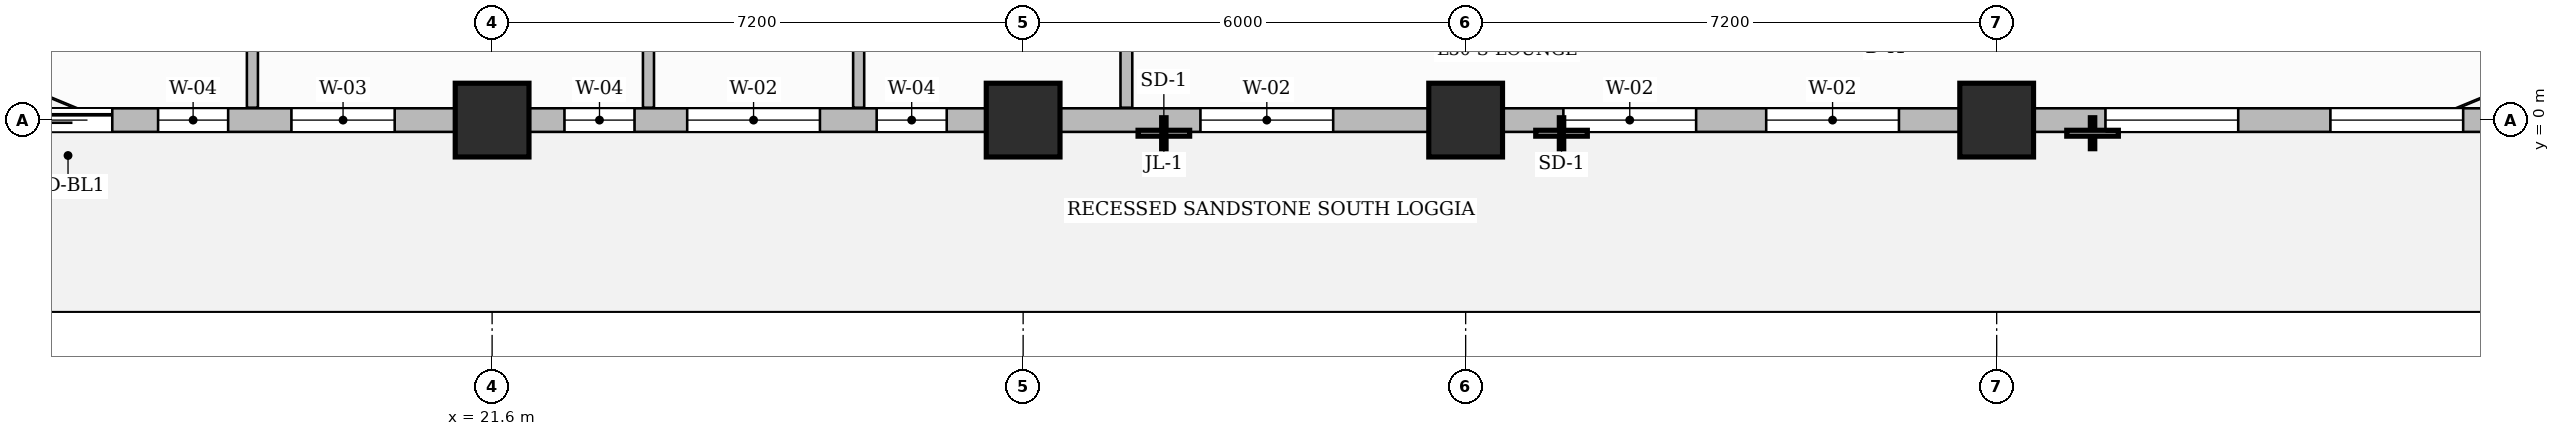
"""IFC4 building model, lengths in metres.
Left out: names, types, materials, properties, quantities, classifications, styles, units other than length and angle.
Written with IfcOpenShell. Run it as: python <this file> out.ifc"""

import sys

from ifc_helpers import new_model, si_unit, direction, frame, frame_2d, origin, origin_2d, place, context, subcontext, project, spatial, rectangle, extrude, source, transform, mapped, element, fill, save


model = new_model("IFC4")
c1 = context("Model", 3, precision=1e-05, world=origin(), true_north=direction((0.0, 1.0)))
c2 = subcontext(c1, "Body", "Model", "MODEL_VIEW")
j1 = project(units=[si_unit("LENGTHUNIT", "METRE"), si_unit("PLANEANGLEUNIT", "RADIAN")], contexts=[c1])
p1 = place(None, origin())
s1 = spatial("IfcSite", under=j1, at=p1, CompositionType="ELEMENT")
p2 = place(p1, origin())
s2 = spatial("IfcBuilding", under=s1, at=p2, CompositionType="ELEMENT")
p3 = place(p2, frame((0.0, 0.0, 122.9)))
s3 = spatial("IfcBuildingStorey", under=s2, at=p3, CompositionType="ELEMENT", Elevation=122.9)
m1 = source(origin(), c2, "Body", "SweptSolid", [
    extrude(rectangle(XDim=1.0, YDim=1.0, at=origin_2d()), origin(), (0.0, 0.0, 1.0), 3.7),
])
for number, where, z_axis, x_axis in (
    (1, (21.6, 0.0, 0.0), (0.0, 0.0, 1.0), (1.0, 0.0, 0.0)),
    (2, (28.8, 0.0, 0.0), (0.0, 0.0, 1.0), (1.0, 0.0, 0.0)),
    (3, (34.8, 0.0, 0.0), (0.0, 0.0, 1.0), (1.0, 0.0, 0.0)),
    (4, (42.0, 0.0, 0.0), (0.0, 0.0, 1.0), (1.0, 0.0, 0.0)),
):
    element("IfcColumn", number, at=place(p3, frame(where, z_axis=z_axis, x_axis=x_axis)), inside=s3, PredefinedType="COLUMN", context=c2, shape_type="MappedRepresentation", body=[
        mapped(m1, transform((0.0, 0.0, 0.0), scale=1.0)),
    ])
p4 = place(p3, frame((30.2, 0.168, 0.0), z_axis=(0.0, 0.0, 1.0), x_axis=(0.0, 1.0, 0.0)))
e5 = element("IfcWall", 5, at=p4, inside=s3, PredefinedType="PARTITIONING", context=c2, shape_type="SweptSolid", body=[
    extrude(rectangle(XDim=10.092, YDim=0.16, at=frame_2d((5.046, 0.0))), origin(), (0.0, 0.0, 1.0), 3.45),
])
p5 = place(p4, frame((1.957, 0.0, 0.0)))
e6 = element("IfcOpeningElement", 6, at=p5, cuts=e5, PredefinedType="OPENING", context=c2, shape_type="SweptSolid", body=[
    extrude(rectangle(XDim=1.05, YDim=2.15, at=frame_2d((0.525, 1.075))), frame((0.0, 0.09, 0.0), z_axis=(0.0, -1.0, 0.0), x_axis=(1.0, 0.0, 0.0)), (0.0, 0.0, 1.0), 0.18),
])
for number, where, z_axis, x_axis in (
    (7, (18.35, 0.168, 0.0), (0.0, 0.0, 1.0), (0.0, 1.0, 0.0)),
    (8, (23.72, 0.168, 0.0), (0.0, 0.0, 1.0), (0.0, 1.0, 0.0)),
    (9, (26.57, 0.168, 0.0), (0.0, 0.0, 1.0), (0.0, 1.0, 0.0)),
):
    element("IfcWall", number, at=place(p3, frame(where, z_axis=z_axis, x_axis=x_axis)), inside=s3, PredefinedType="PARTITIONING", context=c2, shape_type="SweptSolid", body=[
        extrude(rectangle(XDim=10.092, YDim=0.15, at=frame_2d((5.046, 0.0))), origin(), (0.0, 0.0, 1.0), 3.45),
    ])
p6 = place(p3, frame((14.4, 0.0, 0.0), z_axis=(0.0, 0.0, 1.0), x_axis=(1.0, 0.0, 0.0)))
e10 = element("IfcWall", 10, at=p6, inside=s3, PredefinedType="SOLIDWALL", context=c2, shape_type="SweptSolid", body=[
    extrude(rectangle(XDim=35.4, YDim=0.32, at=frame_2d((17.7, 0.0))), origin(), (0.0, 0.0, 1.0), 2.935),
])
p7 = place(p6, frame((0.85, 0.0, 0.0)))
e11 = element("IfcOpeningElement", 11, at=p7, cuts=e10, PredefinedType="OPENING", context=c2, shape_type="SweptSolid", body=[
    extrude(rectangle(XDim=1.2, YDim=2.2, at=frame_2d((0.6, 1.1))), frame((0.0, 0.17, 0.0), z_axis=(0.0, -1.0, 0.0), x_axis=(1.0, 0.0, 0.0)), (0.0, 0.0, 1.0), 0.34),
])
p8 = place(p6, frame((2.671, 0.0, 0.8)))
e12 = element("IfcOpeningElement", 12, at=p8, cuts=e10, PredefinedType="OPENING", context=c2, shape_type="SweptSolid", body=[
    extrude(rectangle(XDim=0.95, YDim=1.75, at=frame_2d((0.475, 0.875))), frame((0.0, 0.17, 0.0), z_axis=(0.0, -1.0, 0.0), x_axis=(1.0, 0.0, 0.0)), (0.0, 0.0, 1.0), 0.34),
])
p9 = place(p6, frame((4.479, 0.0, 0.8)))
e13 = element("IfcOpeningElement", 13, at=p9, cuts=e10, PredefinedType="OPENING", context=c2, shape_type="SweptSolid", body=[
    extrude(rectangle(XDim=1.4, YDim=1.85, at=frame_2d((0.7, 0.925))), frame((0.0, 0.17, 0.0), z_axis=(0.0, -1.0, 0.0), x_axis=(1.0, 0.0, 0.0)), (0.0, 0.0, 1.0), 0.34),
])
p10 = place(p6, frame((8.181, 0.0, 0.8)))
e14 = element("IfcOpeningElement", 14, at=p10, cuts=e10, PredefinedType="OPENING", context=c2, shape_type="SweptSolid", body=[
    extrude(rectangle(XDim=0.95, YDim=1.75, at=frame_2d((0.475, 0.875))), frame((0.0, 0.17, 0.0), z_axis=(0.0, -1.0, 0.0), x_axis=(1.0, 0.0, 0.0)), (0.0, 0.0, 1.0), 0.34),
])
p11 = place(p6, frame((9.845, 0.0, 0.8)))
e15 = element("IfcOpeningElement", 15, at=p11, cuts=e10, PredefinedType="OPENING", context=c2, shape_type="SweptSolid", body=[
    extrude(rectangle(XDim=1.8, YDim=1.85, at=frame_2d((0.9, 0.925))), frame((0.0, 0.17, 0.0), z_axis=(0.0, -1.0, 0.0), x_axis=(1.0, 0.0, 0.0)), (0.0, 0.0, 1.0), 0.34),
])
p12 = place(p6, frame((12.414, 0.0, 0.8)))
e16 = element("IfcOpeningElement", 16, at=p12, cuts=e10, PredefinedType="OPENING", context=c2, shape_type="SweptSolid", body=[
    extrude(rectangle(XDim=0.95, YDim=1.75, at=frame_2d((0.475, 0.875))), frame((0.0, 0.17, 0.0), z_axis=(0.0, -1.0, 0.0), x_axis=(1.0, 0.0, 0.0)), (0.0, 0.0, 1.0), 0.34),
])
p13 = place(p6, frame((16.804, 0.0, 0.8)))
e17 = element("IfcOpeningElement", 17, at=p13, cuts=e10, PredefinedType="OPENING", context=c2, shape_type="SweptSolid", body=[
    extrude(rectangle(XDim=1.8, YDim=1.85, at=frame_2d((0.9, 0.925))), frame((0.0, 0.17, 0.0), z_axis=(0.0, -1.0, 0.0), x_axis=(1.0, 0.0, 0.0)), (0.0, 0.0, 1.0), 0.34),
])
p14 = place(p6, frame((21.725, 0.0, 0.8)))
e18 = element("IfcOpeningElement", 18, at=p14, cuts=e10, PredefinedType="OPENING", context=c2, shape_type="SweptSolid", body=[
    extrude(rectangle(XDim=1.8, YDim=1.85, at=frame_2d((0.9, 0.925))), frame((0.0, 0.17, 0.0), z_axis=(0.0, -1.0, 0.0), x_axis=(1.0, 0.0, 0.0)), (0.0, 0.0, 1.0), 0.34),
])
p15 = place(p6, frame((24.475, 0.0, 0.8)))
e19 = element("IfcOpeningElement", 19, at=p15, cuts=e10, PredefinedType="OPENING", context=c2, shape_type="SweptSolid", body=[
    extrude(rectangle(XDim=1.8, YDim=1.85, at=frame_2d((0.9, 0.925))), frame((0.0, 0.17, 0.0), z_axis=(0.0, -1.0, 0.0), x_axis=(1.0, 0.0, 0.0)), (0.0, 0.0, 1.0), 0.34),
])
p16 = place(p6, frame((29.075, 0.0, 0.8)))
e20 = element("IfcOpeningElement", 20, at=p16, cuts=e10, PredefinedType="OPENING", context=c2, shape_type="SweptSolid", body=[
    extrude(rectangle(XDim=1.8, YDim=1.85, at=frame_2d((0.9, 0.925))), frame((0.0, 0.17, 0.0), z_axis=(0.0, -1.0, 0.0), x_axis=(1.0, 0.0, 0.0)), (0.0, 0.0, 1.0), 0.34),
])
p17 = place(p6, frame((32.125, 0.0, 0.8)))
e21 = element("IfcOpeningElement", 21, at=p17, cuts=e10, PredefinedType="OPENING", context=c2, shape_type="SweptSolid", body=[
    extrude(rectangle(XDim=1.8, YDim=1.85, at=frame_2d((0.9, 0.925))), frame((0.0, 0.17, 0.0), z_axis=(0.0, -1.0, 0.0), x_axis=(1.0, 0.0, 0.0)), (0.0, 0.0, 1.0), 0.34),
])
m2 = source(origin(), c2, "Body", "SweptSolid", [
    extrude(rectangle(XDim=1.2, YDim=2.2, at=frame_2d((0.6, 1.1))), frame((0.0, 0.025, 0.0), z_axis=(0.0, -1.0, 0.0), x_axis=(1.0, 0.0, 0.0)), (0.0, 0.0, 1.0), 0.05),
])
p18 = place(p7, origin())
e22 = element("IfcDoor", 22, at=p18, inside=s3, OperationType="SLIDING_TO_LEFT", PredefinedType="DOOR", context=c2, shape_type="MappedRepresentation", body=[
    mapped(m2, transform((0.0, 0.0, 0.0), scale=1.0)),
])
fill(e11, e22)
m3 = source(origin(), c2, "Body", "SweptSolid", [
    extrude(rectangle(XDim=0.95, YDim=1.75, at=frame_2d((0.475, 0.875))), frame((0.0, 0.03, 0.0), z_axis=(0.0, -1.0, 0.0), x_axis=(1.0, 0.0, 0.0)), (0.0, 0.0, 1.0), 0.06),
])
p19 = place(p8, origin())
e23 = element("IfcWindow", 23, at=p19, inside=s3, PartitioningType="SINGLE_PANEL", PredefinedType="WINDOW", context=c2, shape_type="MappedRepresentation", body=[
    mapped(m3, transform((0.0, 0.0, 0.0), scale=1.0)),
])
fill(e12, e23)
m4 = source(origin(), c2, "Body", "SweptSolid", [
    extrude(rectangle(XDim=1.4, YDim=1.85, at=frame_2d((0.7, 0.925))), frame((0.0, 0.03, 0.0), z_axis=(0.0, -1.0, 0.0), x_axis=(1.0, 0.0, 0.0)), (0.0, 0.0, 1.0), 0.06),
])
p20 = place(p9, origin())
e24 = element("IfcWindow", 24, at=p20, inside=s3, PartitioningType="SINGLE_PANEL", PredefinedType="WINDOW", context=c2, shape_type="MappedRepresentation", body=[
    mapped(m4, transform((0.0, 0.0, 0.0), scale=1.0)),
])
fill(e13, e24)
p21 = place(p10, origin())
e25 = element("IfcWindow", 25, at=p21, inside=s3, PartitioningType="SINGLE_PANEL", PredefinedType="WINDOW", context=c2, shape_type="MappedRepresentation", body=[
    mapped(m3, transform((0.0, 0.0, 0.0), scale=1.0)),
])
fill(e14, e25)
m5 = source(origin(), c2, "Body", "SweptSolid", [
    extrude(rectangle(XDim=1.8, YDim=1.85, at=frame_2d((0.9, 0.925))), frame((0.0, 0.03, 0.0), z_axis=(0.0, -1.0, 0.0), x_axis=(1.0, 0.0, 0.0)), (0.0, 0.0, 1.0), 0.06),
])
p22 = place(p11, origin())
e26 = element("IfcWindow", 26, at=p22, inside=s3, PartitioningType="DOUBLE_PANEL_VERTICAL", PredefinedType="WINDOW", context=c2, shape_type="MappedRepresentation", body=[
    mapped(m5, transform((0.0, 0.0, 0.0), scale=1.0)),
])
fill(e15, e26)
p23 = place(p12, origin())
e27 = element("IfcWindow", 27, at=p23, inside=s3, PartitioningType="SINGLE_PANEL", PredefinedType="WINDOW", context=c2, shape_type="MappedRepresentation", body=[
    mapped(m3, transform((0.0, 0.0, 0.0), scale=1.0)),
])
fill(e16, e27)
p24 = place(p13, origin())
e28 = element("IfcWindow", 28, at=p24, inside=s3, PartitioningType="DOUBLE_PANEL_VERTICAL", PredefinedType="WINDOW", context=c2, shape_type="MappedRepresentation", body=[
    mapped(m5, transform((0.0, 0.0, 0.0), scale=1.0)),
])
fill(e17, e28)
p25 = place(p14, origin())
e29 = element("IfcWindow", 29, at=p25, inside=s3, PartitioningType="DOUBLE_PANEL_VERTICAL", PredefinedType="WINDOW", context=c2, shape_type="MappedRepresentation", body=[
    mapped(m5, transform((0.0, 0.0, 0.0), scale=1.0)),
])
fill(e18, e29)
p26 = place(p15, origin())
e30 = element("IfcWindow", 30, at=p26, inside=s3, PartitioningType="DOUBLE_PANEL_VERTICAL", PredefinedType="WINDOW", context=c2, shape_type="MappedRepresentation", body=[
    mapped(m5, transform((0.0, 0.0, 0.0), scale=1.0)),
])
fill(e19, e30)
p27 = place(p16, origin())
e31 = element("IfcWindow", 31, at=p27, inside=s3, PartitioningType="DOUBLE_PANEL_VERTICAL", PredefinedType="WINDOW", context=c2, shape_type="MappedRepresentation", body=[
    mapped(m5, transform((0.0, 0.0, 0.0), scale=1.0)),
])
fill(e20, e31)
p28 = place(p17, origin())
e32 = element("IfcWindow", 32, at=p28, inside=s3, PartitioningType="DOUBLE_PANEL_VERTICAL", PredefinedType="WINDOW", context=c2, shape_type="MappedRepresentation", body=[
    mapped(m5, transform((0.0, 0.0, 0.0), scale=1.0)),
])
fill(e21, e32)
save(model, sys.argv[1])
